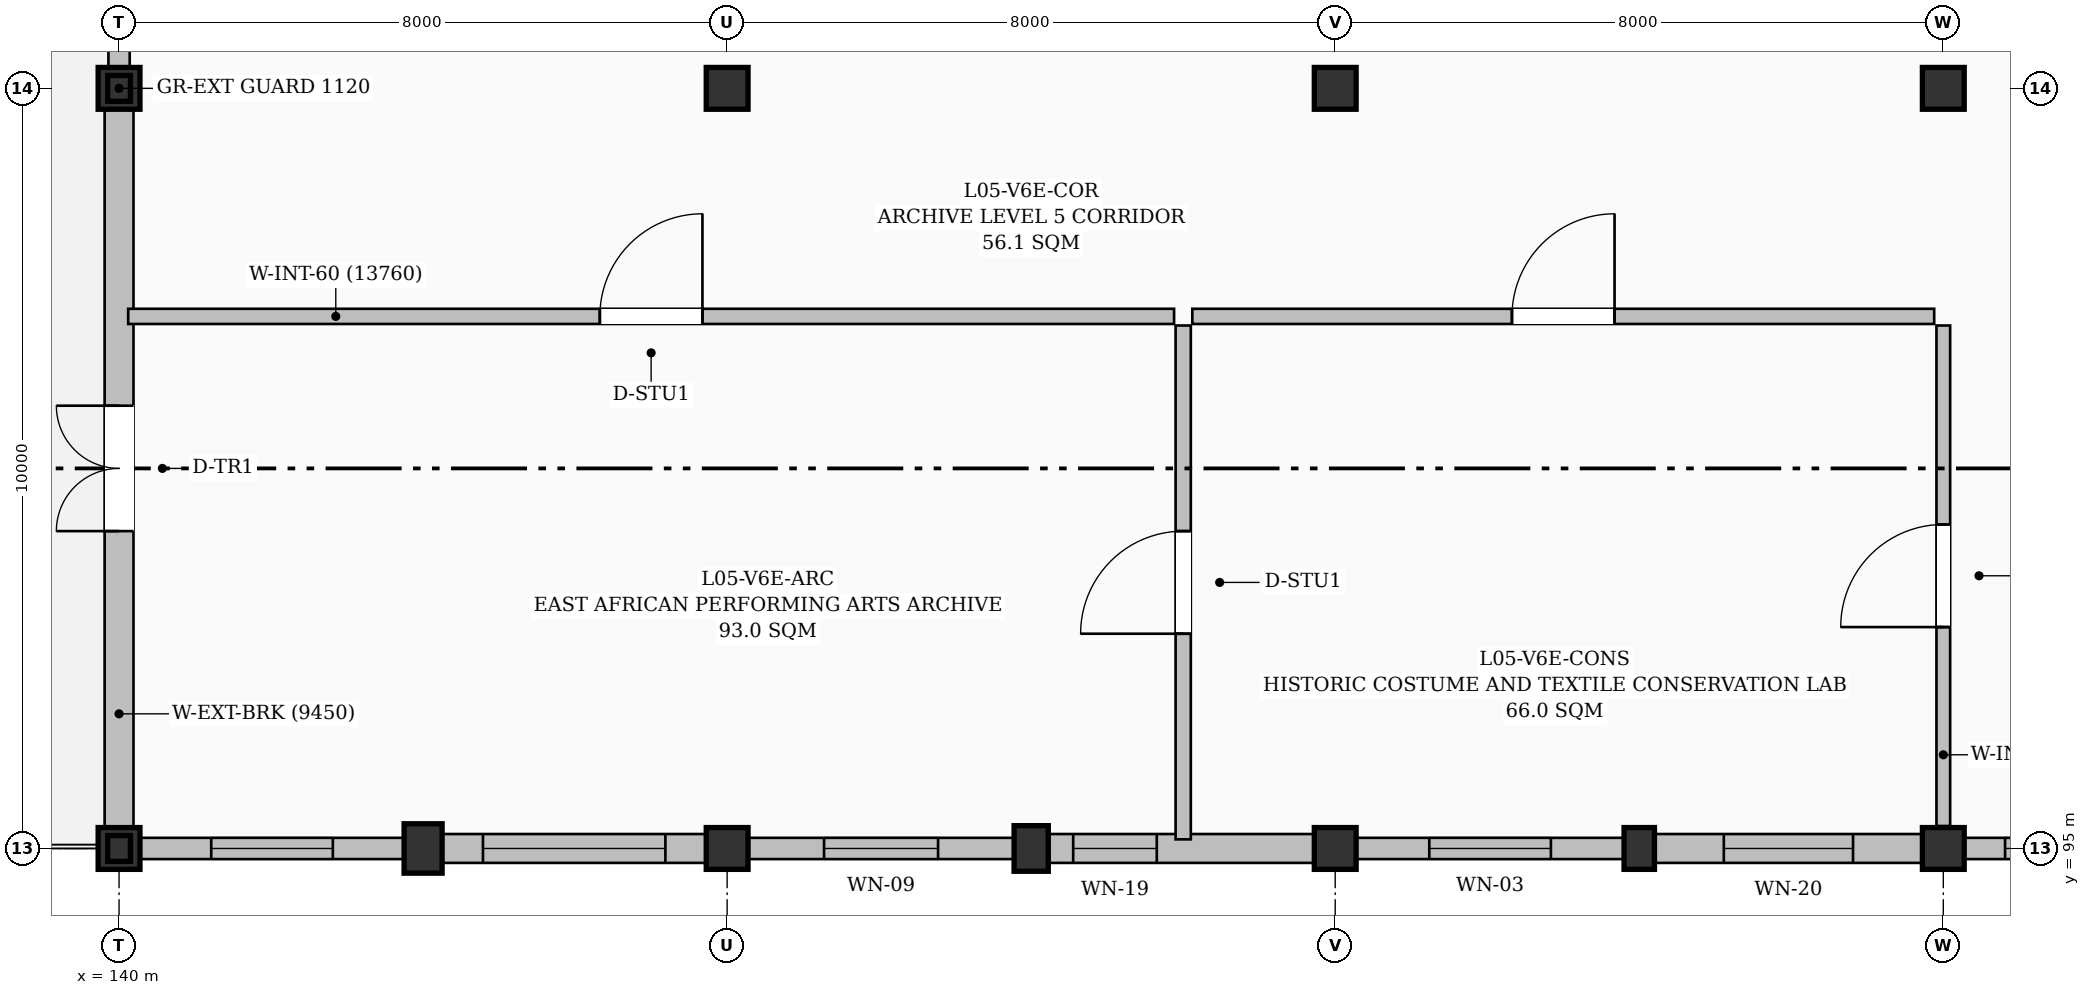
"""IFC4 building model, lengths in metres.
Left out: names, types, materials, properties, quantities, classifications, styles, units other than length and angle.
Written with IfcOpenShell. Run it as: python <this file> out.ifc"""

import sys

from ifc_helpers import new_model, si_unit, direction, frame, frame_2d, origin, origin_2d, place, context, subcontext, project, spatial, rectangle, i_section, extrude, element, fill, save


model = new_model("IFC4")
c1 = context("Model", 3, precision=1e-05, world=origin(), true_north=direction((0.0, 1.0)))
c2 = subcontext(c1, "Body", "Model", "MODEL_VIEW")
j1 = project(units=[si_unit("LENGTHUNIT", "METRE"), si_unit("PLANEANGLEUNIT", "RADIAN")], contexts=[c1])
p1 = place(None, origin())
s1 = spatial("IfcSite", under=j1, at=p1, CompositionType="ELEMENT")
p2 = place(p1, origin())
s2 = spatial("IfcBuilding", under=s1, at=p2, CompositionType="ELEMENT")
p3 = place(p2, frame((0.0, 0.0, 22.8)))
s3 = spatial("IfcBuildingStorey", under=s2, at=p3, CompositionType="ELEMENT", Elevation=22.8)
for number, where, z_axis, x_axis in (
    (1, (140.0, 95.0, 0.0), (0.0, 0.0, 1.0), (1.0, 0.0, 0.0)),
    (2, (140.0, 105.0, 0.0), (0.0, 0.0, 1.0), (1.0, 0.0, 0.0)),
):
    element("IfcColumn", number, at=place(p3, frame(where, z_axis=z_axis, x_axis=x_axis)), inside=s3, PredefinedType="COLUMN", context=c2, shape_type="SweptSolid", body=[
        extrude(rectangle(XDim=0.55, YDim=0.55, at=origin_2d()), origin(), (0.0, 0.0, 1.0), 4.5),
    ])
p4 = place(p3, frame((144.0, 95.0, 0.0), z_axis=(0.0, 0.0, 1.0), x_axis=(1.0, 0.0, 0.0)))
e3 = element("IfcColumn", 3, at=p4, inside=s3, PredefinedType="PILASTER", context=c2, shape_type="SweptSolid", body=[
    extrude(rectangle(XDim=0.5, YDim=0.65, at=origin_2d()), origin(), (0.0, 0.0, 1.0), 4.5),
])
for number, where, z_axis, x_axis in (
    (4, (148.0, 95.0, 0.0), (0.0, 0.0, 1.0), (1.0, 0.0, 0.0)),
    (5, (148.0, 105.0, 0.0), (0.0, 0.0, 1.0), (1.0, 0.0, 0.0)),
):
    element("IfcColumn", number, at=place(p3, frame(where, z_axis=z_axis, x_axis=x_axis)), inside=s3, PredefinedType="COLUMN", context=c2, shape_type="SweptSolid", body=[
        extrude(rectangle(XDim=0.55, YDim=0.55, at=origin_2d()), origin(), (0.0, 0.0, 1.0), 4.5),
    ])
p5 = place(p3, frame((152.0, 95.0, 0.0), z_axis=(0.0, 0.0, 1.0), x_axis=(1.0, 0.0, 0.0)))
e6 = element("IfcColumn", 6, at=p5, inside=s3, PredefinedType="PILASTER", context=c2, shape_type="SweptSolid", body=[
    extrude(rectangle(XDim=0.45, YDim=0.6, at=origin_2d()), origin(), (0.0, 0.0, 1.0), 4.5),
])
for number, where, z_axis, x_axis in (
    (7, (156.0, 95.0, 0.0), (0.0, 0.0, 1.0), (1.0, 0.0, 0.0)),
    (8, (156.0, 105.0, 0.0), (0.0, 0.0, 1.0), (1.0, 0.0, 0.0)),
):
    element("IfcColumn", number, at=place(p3, frame(where, z_axis=z_axis, x_axis=x_axis)), inside=s3, PredefinedType="COLUMN", context=c2, shape_type="SweptSolid", body=[
        extrude(rectangle(XDim=0.55, YDim=0.55, at=origin_2d()), origin(), (0.0, 0.0, 1.0), 4.5),
    ])
p6 = place(p3, frame((160.0, 95.0, 0.0), z_axis=(0.0, 0.0, 1.0), x_axis=(1.0, 0.0, 0.0)))
e9 = element("IfcColumn", 9, at=p6, inside=s3, PredefinedType="PILASTER", context=c2, shape_type="SweptSolid", body=[
    extrude(rectangle(XDim=0.4, YDim=0.55, at=origin_2d()), origin(), (0.0, 0.0, 1.0), 4.5),
])
for number, where, z_axis, x_axis in (
    (10, (164.0, 95.0, 0.0), (0.0, 0.0, 1.0), (1.0, 0.0, 0.0)),
    (11, (164.0, 105.0, 0.0), (0.0, 0.0, 1.0), (1.0, 0.0, 0.0)),
):
    element("IfcColumn", number, at=place(p3, frame(where, z_axis=z_axis, x_axis=x_axis)), inside=s3, PredefinedType="COLUMN", context=c2, shape_type="SweptSolid", body=[
        extrude(rectangle(XDim=0.55, YDim=0.55, at=origin_2d()), origin(), (0.0, 0.0, 1.0), 4.5),
    ])
for number, where, z_axis, x_axis in (
    (12, (140.0, 95.0, 4.5), (0.0, 0.0, 1.0), (1.0, 0.0, 0.0)),
    (13, (140.0, 105.0, 4.5), (0.0, 0.0, 1.0), (1.0, 0.0, 0.0)),
):
    element("IfcColumn", number, at=place(p3, frame(where, z_axis=z_axis, x_axis=x_axis)), inside=s3, PredefinedType="COLUMN", context=c2, shape_type="SweptSolid", body=[
        extrude(i_section(OverallWidth=0.3, OverallDepth=0.34, WebThickness=0.012, FlangeThickness=0.021, FilletRadius=0.027, at=origin_2d()), origin(), (0.0, 0.0, 1.0), 1.342),
    ])
p7 = place(p3, frame((140.0, 95.275, 0.0), z_axis=(0.0, 0.0, 1.0), x_axis=(0.0, 1.0, 0.0)))
e14 = element("IfcWall", 14, at=p7, inside=s3, PredefinedType="SOLIDWALL", context=c2, shape_type="SweptSolid", body=[
    extrude(rectangle(XDim=9.45, YDim=0.38, at=frame_2d((4.725, 0.0))), origin(), (0.0, 0.0, 1.0), 3.585),
])
p8 = place(p7, frame((3.9, 0.0, 0.0)))
e15 = element("IfcOpeningElement", 15, at=p8, cuts=e14, PredefinedType="OPENING", context=c2, shape_type="SweptSolid", body=[
    extrude(rectangle(XDim=1.65, YDim=2.25, at=frame_2d((0.825, 1.125))), frame((0.0, 0.2, 0.0), z_axis=(0.0, -1.0, 0.0), x_axis=(1.0, 0.0, 0.0)), (0.0, 0.0, 1.0), 0.4),
])
p9 = place(p3, frame((140.0, 105.275, 0.0), z_axis=(0.0, 0.0, 1.0), x_axis=(0.0, 1.0, 0.0)))
e16 = element("IfcWall", 16, at=p9, inside=s3, PredefinedType="SOLIDWALL", context=c2, shape_type="SweptSolid", body=[
    extrude(rectangle(XDim=9.45, YDim=0.28, at=frame_2d((4.725, 0.0))), origin(), (0.0, 0.0, 1.0), 3.585),
])
p10 = place(p9, frame((3.525, 0.0, 0.95)))
e17 = element("IfcOpeningElement", 17, at=p10, cuts=e16, PredefinedType="OPENING", context=c2, shape_type="SweptSolid", body=[
    extrude(rectangle(XDim=2.4, YDim=1.2, at=frame_2d((1.2, 0.6))), frame((0.0, 0.15, 0.0), z_axis=(0.0, -1.0, 0.0), x_axis=(1.0, 0.0, 0.0)), (0.0, 0.0, 1.0), 0.3),
])
p11 = place(p3, frame((167.75, 95.0, 0.0), z_axis=(0.0, 0.0, 1.0), x_axis=(-1.0, 0.0, 0.0)))
e18 = element("IfcWall", 18, at=p11, inside=s3, PredefinedType="SOLIDWALL", context=c2, shape_type="SweptSolid", body=[
    extrude(rectangle(XDim=3.475, YDim=0.28, at=frame_2d((1.738, 0.0))), origin(), (0.0, 0.0, 1.0), 4.125),
])
p12 = place(p11, frame((0.538, 0.0, 0.95)))
e19 = element("IfcOpeningElement", 19, at=p12, cuts=e18, PredefinedType="OPENING", context=c2, shape_type="SweptSolid", body=[
    extrude(rectangle(XDim=2.4, YDim=1.2, at=frame_2d((1.2, 0.6))), frame((0.0, 0.15, 0.0), z_axis=(0.0, -1.0, 0.0), x_axis=(1.0, 0.0, 0.0)), (0.0, 0.0, 1.0), 0.3),
])
p13 = place(p3, frame((163.725, 95.0, 0.0), z_axis=(0.0, 0.0, 1.0), x_axis=(-1.0, 0.0, 0.0)))
e20 = element("IfcWall", 20, at=p13, inside=s3, PredefinedType="SOLIDWALL", context=c2, shape_type="SweptSolid", body=[
    extrude(rectangle(XDim=3.525, YDim=0.38, at=frame_2d((1.763, 0.0))), origin(), (0.0, 0.0, 1.0), 4.125),
])
p14 = place(p13, frame((0.913, 0.0, 0.95)))
e21 = element("IfcOpeningElement", 21, at=p14, cuts=e20, PredefinedType="OPENING", context=c2, shape_type="SweptSolid", body=[
    extrude(rectangle(XDim=1.7, YDim=2.0, at=frame_2d((0.85, 1.0))), frame((0.0, 0.2, 0.0), z_axis=(0.0, -1.0, 0.0), x_axis=(1.0, 0.0, 0.0)), (0.0, 0.0, 1.0), 0.4),
])
p15 = place(p3, frame((159.8, 95.0, 0.0), z_axis=(0.0, 0.0, 1.0), x_axis=(-1.0, 0.0, 0.0)))
e22 = element("IfcWall", 22, at=p15, inside=s3, PredefinedType="SOLIDWALL", context=c2, shape_type="SweptSolid", body=[
    extrude(rectangle(XDim=3.525, YDim=0.28, at=frame_2d((1.763, 0.0))), origin(), (0.0, 0.0, 1.0), 4.125),
])
p16 = place(p15, frame((0.962, 0.0, 0.95)))
e23 = element("IfcOpeningElement", 23, at=p16, cuts=e22, PredefinedType="OPENING", context=c2, shape_type="SweptSolid", body=[
    extrude(rectangle(XDim=1.6, YDim=1.8, at=frame_2d((0.8, 0.9))), frame((0.0, 0.15, 0.0), z_axis=(0.0, -1.0, 0.0), x_axis=(1.0, 0.0, 0.0)), (0.0, 0.0, 1.0), 0.3),
])
p17 = place(p3, frame((155.725, 95.0, 0.0), z_axis=(0.0, 0.0, 1.0), x_axis=(-1.0, 0.0, 0.0)))
e24 = element("IfcWall", 24, at=p17, inside=s3, PredefinedType="SOLIDWALL", context=c2, shape_type="SweptSolid", body=[
    extrude(rectangle(XDim=3.5, YDim=0.38, at=frame_2d((1.75, 0.0))), origin(), (0.0, 0.0, 1.0), 4.125),
])
p18 = place(p17, frame((2.073, 0.0, 0.95)))
e25 = element("IfcOpeningElement", 25, at=p18, cuts=e24, PredefinedType="OPENING", context=c2, shape_type="SweptSolid", body=[
    extrude(rectangle(XDim=1.1, YDim=2.0, at=frame_2d((0.55, 1.0))), frame((0.0, 0.2, 0.0), z_axis=(0.0, -1.0, 0.0), x_axis=(1.0, 0.0, 0.0)), (0.0, 0.0, 1.0), 0.4),
])
p19 = place(p3, frame((151.775, 95.0, 0.0), z_axis=(0.0, 0.0, 1.0), x_axis=(-1.0, 0.0, 0.0)))
e26 = element("IfcWall", 26, at=p19, inside=s3, PredefinedType="SOLIDWALL", context=c2, shape_type="SweptSolid", body=[
    extrude(rectangle(XDim=3.5, YDim=0.28, at=frame_2d((1.75, 0.0))), origin(), (0.0, 0.0, 1.0), 4.125),
])
p20 = place(p19, frame((1.0, 0.0, 0.95)))
e27 = element("IfcOpeningElement", 27, at=p20, cuts=e26, PredefinedType="OPENING", context=c2, shape_type="SweptSolid", body=[
    extrude(rectangle(XDim=1.5, YDim=1.5, at=frame_2d((0.75, 0.75))), frame((0.0, 0.15, 0.0), z_axis=(0.0, -1.0, 0.0), x_axis=(1.0, 0.0, 0.0)), (0.0, 0.0, 1.0), 0.3),
])
p21 = place(p3, frame((147.725, 95.0, 0.0), z_axis=(0.0, 0.0, 1.0), x_axis=(-1.0, 0.0, 0.0)))
e28 = element("IfcWall", 28, at=p21, inside=s3, PredefinedType="SOLIDWALL", context=c2, shape_type="SweptSolid", body=[
    extrude(rectangle(XDim=3.475, YDim=0.38, at=frame_2d((1.738, 0.0))), origin(), (0.0, 0.0, 1.0), 4.125),
])
p22 = place(p21, frame((0.538, 0.0, 0.95)))
e29 = element("IfcOpeningElement", 29, at=p22, cuts=e28, PredefinedType="OPENING", context=c2, shape_type="SweptSolid", body=[
    extrude(rectangle(XDim=2.4, YDim=1.5, at=frame_2d((1.2, 0.75))), frame((0.0, 0.2, 0.0), z_axis=(0.0, -1.0, 0.0), x_axis=(1.0, 0.0, 0.0)), (0.0, 0.0, 1.0), 0.4),
])
p23 = place(p3, frame((143.75, 95.0, 0.0), z_axis=(0.0, 0.0, 1.0), x_axis=(-1.0, 0.0, 0.0)))
e30 = element("IfcWall", 30, at=p23, inside=s3, PredefinedType="SOLIDWALL", context=c2, shape_type="SweptSolid", body=[
    extrude(rectangle(XDim=3.475, YDim=0.28, at=frame_2d((1.738, 0.0))), origin(), (0.0, 0.0, 1.0), 4.125),
])
p24 = place(p23, frame((0.938, 0.0, 0.95)))
e31 = element("IfcOpeningElement", 31, at=p24, cuts=e30, PredefinedType="OPENING", context=c2, shape_type="SweptSolid", body=[
    extrude(rectangle(XDim=1.6, YDim=1.2, at=frame_2d((0.8, 0.6))), frame((0.0, 0.15, 0.0), z_axis=(0.0, -1.0, 0.0), x_axis=(1.0, 0.0, 0.0)), (0.0, 0.0, 1.0), 0.3),
])
p25 = place(p3, frame((154.0, 95.12, 0.0), z_axis=(0.0, 0.0, 1.0), x_axis=(0.0, 1.0, 0.0)))
e32 = element("IfcWall", 32, at=p25, inside=s3, PredefinedType="PARTITIONING", context=c2, shape_type="SweptSolid", body=[
    extrude(rectangle(XDim=6.76, YDim=0.2, at=frame_2d((3.38, 0.0))), origin(), (0.0, 0.0, 1.0), 3.997),
])
p26 = place(p25, frame((2.705, 0.0, 0.0)))
e33 = element("IfcOpeningElement", 33, at=p26, cuts=e32, PredefinedType="OPENING", context=c2, shape_type="SweptSolid", body=[
    extrude(rectangle(XDim=1.35, YDim=2.2, at=frame_2d((0.675, 1.1))), frame((0.0, 0.11, 0.0), z_axis=(0.0, -1.0, 0.0), x_axis=(1.0, 0.0, 0.0)), (0.0, 0.0, 1.0), 0.22),
])
p27 = place(p3, frame((140.12, 102.0, 0.0), z_axis=(0.0, 0.0, 1.0), x_axis=(1.0, 0.0, 0.0)))
e34 = element("IfcWall", 34, at=p27, inside=s3, PredefinedType="PARTITIONING", context=c2, shape_type="SweptSolid", body=[
    extrude(rectangle(XDim=13.76, YDim=0.2, at=frame_2d((6.88, 0.0))), origin(), (0.0, 0.0, 1.0), 4.25),
])
p28 = place(p27, frame((6.205, 0.0, 0.0)))
e35 = element("IfcOpeningElement", 35, at=p28, cuts=e34, PredefinedType="OPENING", context=c2, shape_type="SweptSolid", body=[
    extrude(rectangle(XDim=1.35, YDim=2.2, at=frame_2d((0.675, 1.1))), frame((0.0, 0.11, 0.0), z_axis=(0.0, -1.0, 0.0), x_axis=(1.0, 0.0, 0.0)), (0.0, 0.0, 1.0), 0.22),
])
p29 = place(p3, frame((164.0, 95.295, 0.0), z_axis=(0.0, 0.0, 1.0), x_axis=(0.0, 1.0, 0.0)))
e36 = element("IfcWall", 36, at=p29, inside=s3, PredefinedType="PARTITIONING", context=c2, shape_type="SweptSolid", body=[
    extrude(rectangle(XDim=6.585, YDim=0.18, at=frame_2d((3.292, 0.0))), origin(), (0.0, 0.0, 1.0), 4.25),
])
p30 = place(p29, frame((2.617, 0.0, 0.0)))
e37 = element("IfcOpeningElement", 37, at=p30, cuts=e36, PredefinedType="OPENING", context=c2, shape_type="SweptSolid", body=[
    extrude(rectangle(XDim=1.35, YDim=2.2, at=frame_2d((0.675, 1.1))), frame((0.0, 0.1, 0.0), z_axis=(0.0, -1.0, 0.0), x_axis=(1.0, 0.0, 0.0)), (0.0, 0.0, 1.0), 0.2),
])
p31 = place(p3, frame((154.12, 102.0, 0.0), z_axis=(0.0, 0.0, 1.0), x_axis=(1.0, 0.0, 0.0)))
e38 = element("IfcWall", 38, at=p31, inside=s3, PredefinedType="PARTITIONING", context=c2, shape_type="SweptSolid", body=[
    extrude(rectangle(XDim=9.76, YDim=0.2, at=frame_2d((4.88, 0.0))), origin(), (0.0, 0.0, 1.0), 4.25),
])
p32 = place(p31, frame((4.205, 0.0, 0.0)))
e39 = element("IfcOpeningElement", 39, at=p32, cuts=e38, PredefinedType="OPENING", context=c2, shape_type="SweptSolid", body=[
    extrude(rectangle(XDim=1.35, YDim=2.2, at=frame_2d((0.675, 1.1))), frame((0.0, 0.11, 0.0), z_axis=(0.0, -1.0, 0.0), x_axis=(1.0, 0.0, 0.0)), (0.0, 0.0, 1.0), 0.22),
])
p33 = place(p8, origin())
e40 = element("IfcDoor", 40, at=p33, inside=s3, OperationType="DOUBLE_DOOR_SINGLE_SWING", PredefinedType="DOOR", context=c2, shape_type="SweptSolid", body=[
    extrude(rectangle(XDim=1.65, YDim=2.25, at=frame_2d((0.825, 1.125))), frame((0.0, 0.025, 0.0), z_axis=(0.0, -1.0, 0.0), x_axis=(1.0, 0.0, 0.0)), (0.0, 0.0, 1.0), 0.05),
])
fill(e15, e40)
p34 = place(p12, origin())
e41 = element("IfcWindow", 41, at=p34, inside=s3, PartitioningType="TRIPLE_PANEL_HORIZONTAL", PredefinedType="WINDOW", context=c2, shape_type="SweptSolid", body=[
    extrude(rectangle(XDim=2.4, YDim=1.2, at=frame_2d((1.2, 0.6))), frame((0.0, 0.03, 0.0), z_axis=(0.0, -1.0, 0.0), x_axis=(1.0, 0.0, 0.0)), (0.0, 0.0, 1.0), 0.06),
])
fill(e19, e41)
p35 = place(p14, origin())
e42 = element("IfcWindow", 42, at=p35, inside=s3, PartitioningType="DOUBLE_PANEL_VERTICAL", PredefinedType="WINDOW", context=c2, shape_type="SweptSolid", body=[
    extrude(rectangle(XDim=1.7, YDim=2.0, at=frame_2d((0.85, 1.0))), frame((0.0, 0.03, 0.0), z_axis=(0.0, -1.0, 0.0), x_axis=(1.0, 0.0, 0.0)), (0.0, 0.0, 1.0), 0.06),
])
fill(e21, e42)
p36 = place(p16, origin())
e43 = element("IfcWindow", 43, at=p36, inside=s3, PartitioningType="DOUBLE_PANEL_VERTICAL", PredefinedType="WINDOW", context=c2, shape_type="SweptSolid", body=[
    extrude(rectangle(XDim=1.6, YDim=1.8, at=frame_2d((0.8, 0.9))), frame((0.0, 0.03, 0.0), z_axis=(0.0, -1.0, 0.0), x_axis=(1.0, 0.0, 0.0)), (0.0, 0.0, 1.0), 0.06),
])
fill(e23, e43)
p37 = place(p18, origin())
e44 = element("IfcWindow", 44, at=p37, inside=s3, PartitioningType="TRIPLE_PANEL_VERTICAL", PredefinedType="WINDOW", context=c2, shape_type="SweptSolid", body=[
    extrude(rectangle(XDim=1.1, YDim=2.0, at=frame_2d((0.55, 1.0))), frame((0.0, 0.03, 0.0), z_axis=(0.0, -1.0, 0.0), x_axis=(1.0, 0.0, 0.0)), (0.0, 0.0, 1.0), 0.06),
])
fill(e25, e44)
p38 = place(p20, origin())
e45 = element("IfcWindow", 45, at=p38, inside=s3, PartitioningType="DOUBLE_PANEL_VERTICAL", PredefinedType="WINDOW", context=c2, shape_type="SweptSolid", body=[
    extrude(rectangle(XDim=1.5, YDim=1.5, at=frame_2d((0.75, 0.75))), frame((0.0, 0.03, 0.0), z_axis=(0.0, -1.0, 0.0), x_axis=(1.0, 0.0, 0.0)), (0.0, 0.0, 1.0), 0.06),
])
fill(e27, e45)
p39 = place(p22, origin())
e46 = element("IfcWindow", 46, at=p39, inside=s3, PartitioningType="TRIPLE_PANEL_VERTICAL", PredefinedType="WINDOW", context=c2, shape_type="SweptSolid", body=[
    extrude(rectangle(XDim=2.4, YDim=1.5, at=frame_2d((1.2, 0.75))), frame((0.0, 0.03, 0.0), z_axis=(0.0, -1.0, 0.0), x_axis=(1.0, 0.0, 0.0)), (0.0, 0.0, 1.0), 0.06),
])
fill(e29, e46)
p40 = place(p24, origin())
e47 = element("IfcWindow", 47, at=p40, inside=s3, PartitioningType="DOUBLE_PANEL_HORIZONTAL", PredefinedType="WINDOW", context=c2, shape_type="SweptSolid", body=[
    extrude(rectangle(XDim=1.6, YDim=1.2, at=frame_2d((0.8, 0.6))), frame((0.0, 0.03, 0.0), z_axis=(0.0, -1.0, 0.0), x_axis=(1.0, 0.0, 0.0)), (0.0, 0.0, 1.0), 0.06),
])
fill(e31, e47)
p41 = place(p26, origin())
e48 = element("IfcDoor", 48, at=p41, inside=s3, OperationType="SINGLE_SWING_LEFT", PredefinedType="DOOR", context=c2, shape_type="SweptSolid", body=[
    extrude(rectangle(XDim=1.35, YDim=2.2, at=frame_2d((0.675, 1.1))), frame((0.0, 0.025, 0.0), z_axis=(0.0, -1.0, 0.0), x_axis=(1.0, 0.0, 0.0)), (0.0, 0.0, 1.0), 0.05),
])
fill(e33, e48)
p42 = place(p28, origin())
e49 = element("IfcDoor", 49, at=p42, inside=s3, OperationType="SINGLE_SWING_RIGHT", PredefinedType="DOOR", context=c2, shape_type="SweptSolid", body=[
    extrude(rectangle(XDim=1.35, YDim=2.2, at=frame_2d((0.675, 1.1))), frame((0.0, 0.025, 0.0), z_axis=(0.0, -1.0, 0.0), x_axis=(1.0, 0.0, 0.0)), (0.0, 0.0, 1.0), 0.05),
])
fill(e35, e49)
p43 = place(p30, origin())
e50 = element("IfcDoor", 50, at=p43, inside=s3, OperationType="SINGLE_SWING_LEFT", PredefinedType="DOOR", context=c2, shape_type="SweptSolid", body=[
    extrude(rectangle(XDim=1.35, YDim=2.2, at=frame_2d((0.675, 1.1))), frame((0.0, 0.025, 0.0), z_axis=(0.0, -1.0, 0.0), x_axis=(1.0, 0.0, 0.0)), (0.0, 0.0, 1.0), 0.05),
])
fill(e37, e50)
p44 = place(p32, origin())
e51 = element("IfcDoor", 51, at=p44, inside=s3, OperationType="SINGLE_SWING_RIGHT", PredefinedType="DOOR", context=c2, shape_type="SweptSolid", body=[
    extrude(rectangle(XDim=1.35, YDim=2.2, at=frame_2d((0.675, 1.1))), frame((0.0, 0.025, 0.0), z_axis=(0.0, -1.0, 0.0), x_axis=(1.0, 0.0, 0.0)), (0.0, 0.0, 1.0), 0.05),
])
fill(e39, e51)
save(model, sys.argv[1])
